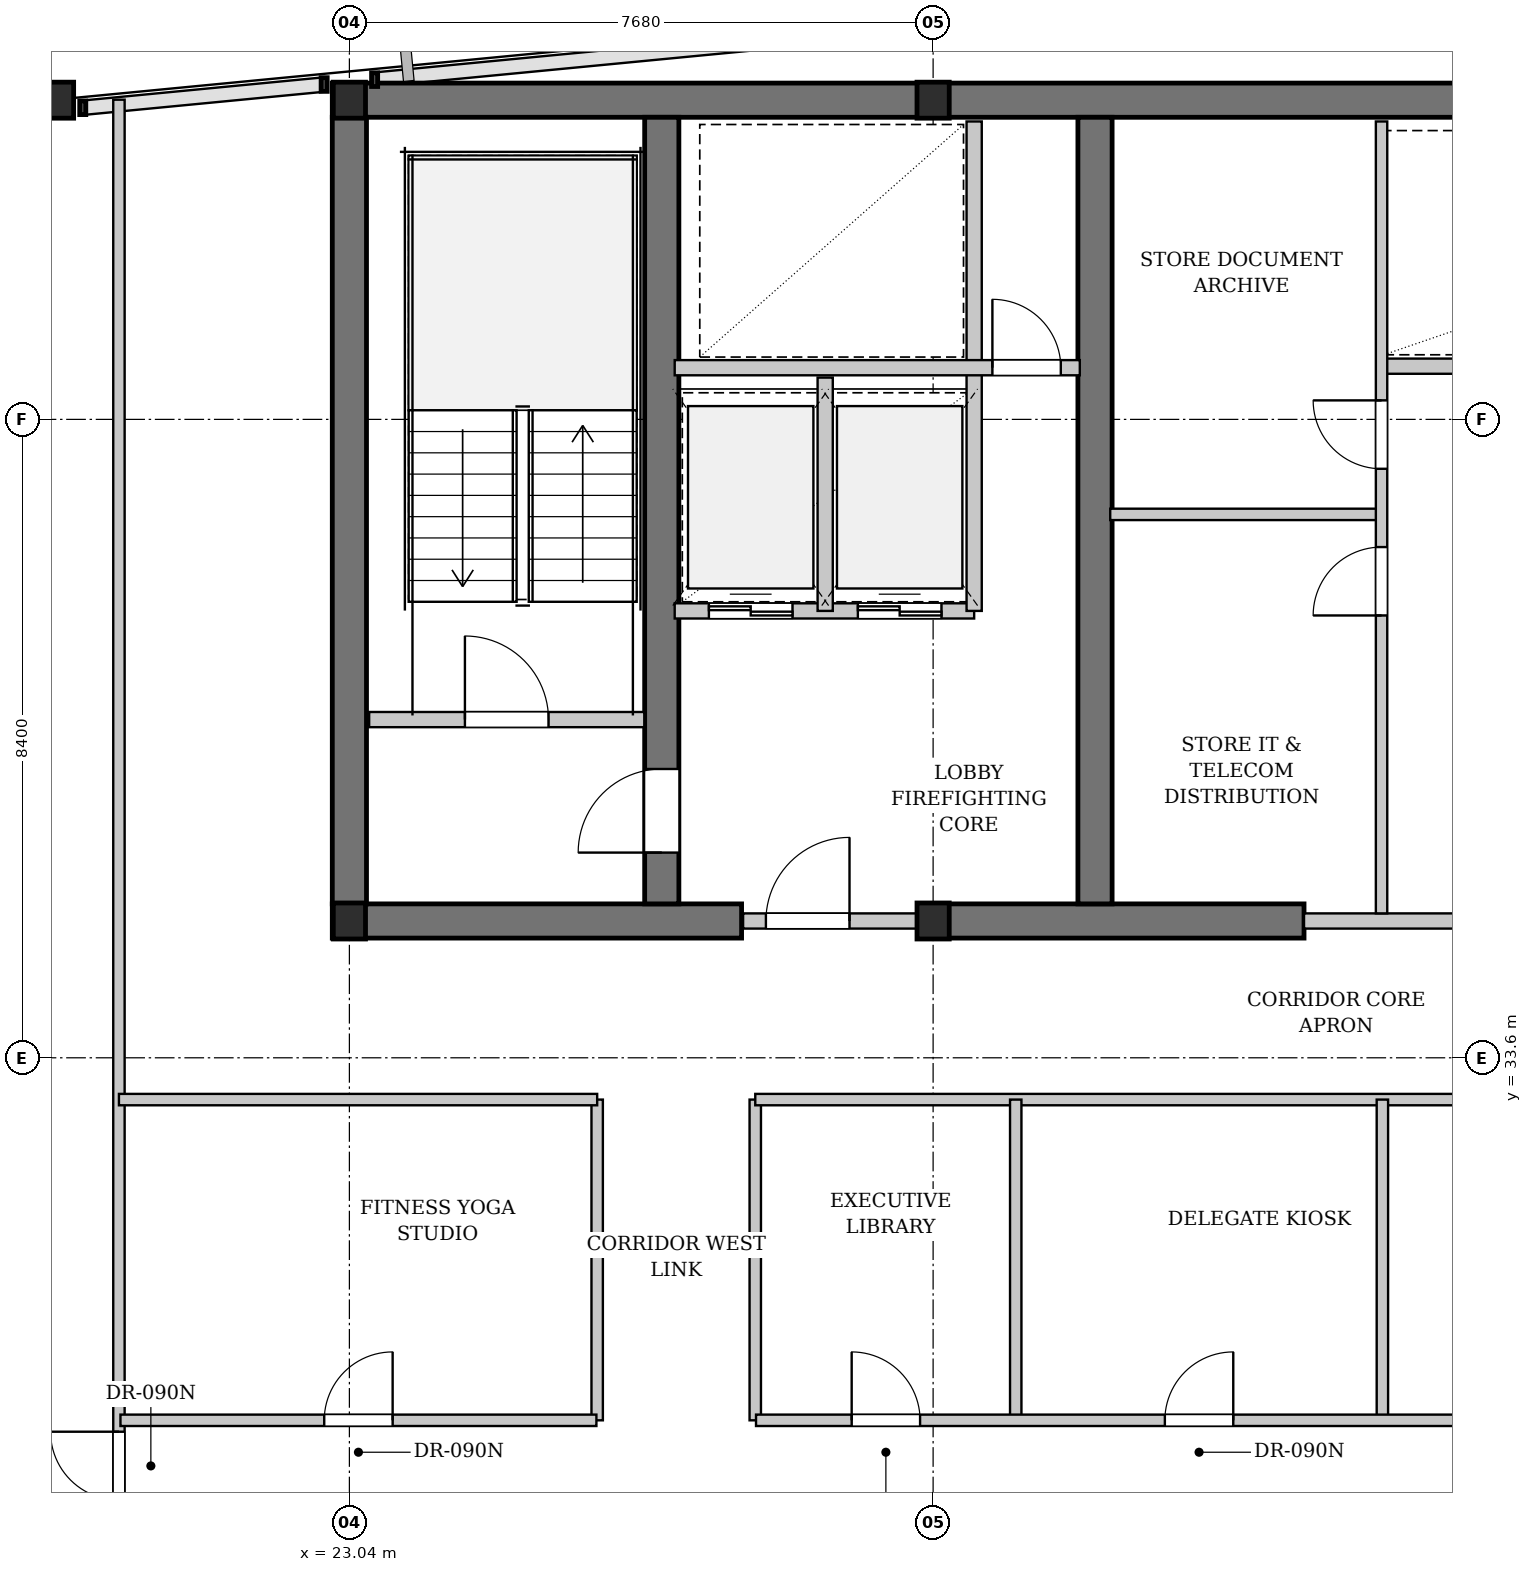
"""IFC4 building model, lengths in metres.
Left out: names, types, materials, properties, quantities, classifications, styles, units other than length and angle.
Written with IfcOpenShell. Run it as: python <this file> out.ifc"""

import sys

from ifc_helpers import new_model, si_unit, direction, frame, frame_2d, origin, origin_2d, place, context, subcontext, project, spatial, rectangle, i_section, extrude, element, fill, save


model = new_model("IFC4")
c1 = context("Model", 3, precision=1e-05, world=origin(), true_north=direction((0.0, 1.0)))
c2 = subcontext(c1, "Body", "Model", "MODEL_VIEW")
j1 = project(units=[si_unit("LENGTHUNIT", "METRE"), si_unit("PLANEANGLEUNIT", "RADIAN")], contexts=[c1])
p1 = place(None, origin())
s1 = spatial("IfcSite", under=j1, at=p1, CompositionType="ELEMENT")
p2 = place(p1, origin())
s2 = spatial("IfcBuilding", under=s1, at=p2, CompositionType="ELEMENT")
p3 = place(p2, frame((0.0, 0.0, 106.7)))
s3 = spatial("IfcBuildingStorey", under=s2, at=p3, CompositionType="ELEMENT", Elevation=106.7)
p4 = place(p3, frame((22.815, 46.2, 0.0), z_axis=(0.0, 0.0, 1.0), x_axis=(1.0, 0.0, 0.0)))
e1 = element("IfcWall", 1, at=p4, inside=s3, PredefinedType="SHEAR", context=c2, shape_type="SweptSolid", body=[
    extrude(rectangle(XDim=31.17, YDim=0.45, at=frame_2d((15.585, 0.0))), origin(), (0.0, 0.0, 1.0), 3.18),
])
p5 = place(p3, frame((22.815, 35.4, 0.0), z_axis=(0.0, 0.0, 1.0), x_axis=(1.0, 0.0, 0.0)))
e2 = element("IfcWall", 2, at=p5, inside=s3, PredefinedType="SHEAR", context=c2, shape_type="SweptSolid", body=[
    extrude(rectangle(XDim=5.385, YDim=0.45, at=frame_2d((2.692, 0.0))), origin(), (0.0, 0.0, 1.0), 3.18),
])
p6 = place(p3, frame((30.72, 35.4, 0.0), z_axis=(0.0, 0.0, 1.0), x_axis=(1.0, 0.0, 0.0)))
e3 = element("IfcWall", 3, at=p6, inside=s3, PredefinedType="SHEAR", context=c2, shape_type="SweptSolid", body=[
    extrude(rectangle(XDim=4.88, YDim=0.45, at=frame_2d((2.44, 0.0))), origin(), (0.0, 0.0, 1.0), 3.18),
])
p7 = place(p3, frame((23.04, 35.625, 0.0), z_axis=(0.0, 0.0, 1.0), x_axis=(0.0, 1.0, 0.0)))
e4 = element("IfcWall", 4, at=p7, inside=s3, PredefinedType="SHEAR", context=c2, shape_type="SweptSolid", body=[
    extrude(rectangle(XDim=10.35, YDim=0.45, at=frame_2d((5.175, 0.0))), origin(), (0.0, 0.0, 1.0), 3.18),
])
p8 = place(p3, frame((27.15, 35.625, 0.0), z_axis=(0.0, 0.0, 1.0), x_axis=(0.0, 1.0, 0.0)))
e5 = element("IfcWall", 5, at=p8, inside=s3, PredefinedType="SHEAR", context=c2, shape_type="SweptSolid", body=[
    extrude(rectangle(XDim=10.35, YDim=0.45, at=frame_2d((5.175, 0.0))), origin(), (0.0, 0.0, 1.0), 3.18),
])
p9 = place(p8, frame((0.675, 0.0, 0.0)))
e6 = element("IfcOpeningElement", 6, at=p9, cuts=e5, PredefinedType="OPENING", context=c2, shape_type="SweptSolid", body=[
    extrude(rectangle(XDim=1.1, YDim=2.15, at=frame_2d((0.55, 1.075))), frame((0.0, 0.235, 0.0), z_axis=(0.0, -1.0, 0.0), x_axis=(1.0, 0.0, 0.0)), (0.0, 0.0, 1.0), 0.47),
])
p10 = place(p3, frame((32.85, 35.625, 0.0), z_axis=(0.0, 0.0, 1.0), x_axis=(0.0, 1.0, 0.0)))
e7 = element("IfcWall", 7, at=p10, inside=s3, PredefinedType="SHEAR", context=c2, shape_type="SweptSolid", body=[
    extrude(rectangle(XDim=10.35, YDim=0.45, at=frame_2d((5.175, 0.0))), origin(), (0.0, 0.0, 1.0), 3.18),
])
for number, where, z_axis, x_axis in (
    (8, (23.04, 35.4, 0.0), (0.0, 0.0, 1.0), (1.0, 0.0, 0.0)),
    (9, (23.04, 46.2, 0.0), (0.0, 0.0, 1.0), (1.0, 0.0, 0.0)),
    (10, (30.72, 35.4, 0.0), (0.0, 0.0, 1.0), (1.0, 0.0, 0.0)),
    (11, (30.72, 46.2, 0.0), (0.0, 0.0, 1.0), (1.0, 0.0, 0.0)),
    (12, (19.2, 46.2, 0.0), (0.0, 0.0, 1.0), (1.0, 0.0, 0.0)),
):
    element("IfcColumn", number, at=place(p3, frame(where, z_axis=z_axis, x_axis=x_axis)), inside=s3, PredefinedType="COLUMN", context=c2, shape_type="SweptSolid", body=[
        extrude(i_section(OverallWidth=0.424, OverallDepth=0.474, WebThickness=0.047, FlangeThickness=0.077, FilletRadius=0.015, at=origin_2d()), origin(), (0.0, 0.0, 1.0), 3.4),
    ])
p11 = place(p3, frame((23.3, 38.05, 0.0), z_axis=(0.0, 0.0, 1.0), x_axis=(1.0, 0.0, 0.0)))
e13 = element("IfcWall", 13, at=p11, inside=s3, PredefinedType="PARTITIONING", context=c2, shape_type="SweptSolid", body=[
    extrude(rectangle(XDim=3.62, YDim=0.2, at=frame_2d((1.81, 0.0))), origin(), (0.0, 0.0, 1.0), 3.18),
])
p12 = place(p11, frame((1.26, 0.0, 0.0)))
e14 = element("IfcOpeningElement", 14, at=p12, cuts=e13, PredefinedType="OPENING", context=c2, shape_type="SweptSolid", body=[
    extrude(rectangle(XDim=1.1, YDim=2.15, at=frame_2d((0.55, 1.075))), frame((0.0, 0.11, 0.0), z_axis=(0.0, -1.0, 0.0), x_axis=(1.0, 0.0, 0.0)), (0.0, 0.0, 1.0), 0.22),
])
p13 = place(p3, frame((28.22, 35.4, 0.0), z_axis=(0.0, 0.0, 1.0), x_axis=(1.0, 0.0, 0.0)))
e15 = element("IfcWall", 15, at=p13, inside=s3, PredefinedType="PARTITIONING", context=c2, shape_type="SweptSolid", body=[
    extrude(rectangle(XDim=2.5, YDim=0.2, at=frame_2d((1.25, 0.0))), origin(), (0.0, 0.0, 1.0), 2.525),
])
p14 = place(p13, frame((0.3, 0.0, 0.0)))
e16 = element("IfcOpeningElement", 16, at=p14, cuts=e15, PredefinedType="OPENING", context=c2, shape_type="SweptSolid", body=[
    extrude(rectangle(XDim=1.1, YDim=2.15, at=frame_2d((0.55, 1.075))), frame((0.0, 0.11, 0.0), z_axis=(0.0, -1.0, 0.0), x_axis=(1.0, 0.0, 0.0)), (0.0, 0.0, 1.0), 0.22),
])
p15 = place(p3, frame((27.32, 39.48, 0.0), z_axis=(0.0, 0.0, 1.0), x_axis=(1.0, 0.0, 0.0)))
e17 = element("IfcWall", 17, at=p15, inside=s3, PredefinedType="PARTITIONING", context=c2, shape_type="SweptSolid", body=[
    extrude(rectangle(XDim=3.94, YDim=0.2, at=frame_2d((1.97, 0.0))), origin(), (0.0, 0.0, 1.0), 3.18),
])
p16 = place(p15, frame((0.45, 0.0, 0.0)))
e18 = element("IfcOpeningElement", 18, at=p16, cuts=e17, PredefinedType="OPENING", context=c2, shape_type="SweptSolid", body=[
    extrude(rectangle(XDim=1.1, YDim=2.2, at=frame_2d((0.55, 1.1))), frame((0.0, 0.11, 0.0), z_axis=(0.0, -1.0, 0.0), x_axis=(1.0, 0.0, 0.0)), (0.0, 0.0, 1.0), 0.22),
])
p17 = place(p15, frame((2.41, 0.0, 0.0)))
e19 = element("IfcOpeningElement", 19, at=p17, cuts=e17, PredefinedType="OPENING", context=c2, shape_type="SweptSolid", body=[
    extrude(rectangle(XDim=1.1, YDim=2.2, at=frame_2d((0.55, 1.1))), frame((0.0, 0.11, 0.0), z_axis=(0.0, -1.0, 0.0), x_axis=(1.0, 0.0, 0.0)), (0.0, 0.0, 1.0), 0.22),
])
p18 = place(p3, frame((29.3, 39.48, 0.0), z_axis=(0.0, 0.0, 1.0), x_axis=(0.0, 1.0, 0.0)))
e20 = element("IfcWall", 20, at=p18, inside=s3, PredefinedType="PARTITIONING", context=c2, shape_type="SweptSolid", body=[
    extrude(rectangle(XDim=3.07, YDim=0.2, at=frame_2d((1.535, 0.0))), origin(), (0.0, 0.0, 1.0), 3.18),
])
p19 = place(p3, frame((31.26, 39.48, 0.0), z_axis=(0.0, 0.0, 1.0), x_axis=(0.0, 1.0, 0.0)))
e21 = element("IfcWall", 21, at=p19, inside=s3, PredefinedType="PARTITIONING", context=c2, shape_type="SweptSolid", body=[
    extrude(rectangle(XDim=6.44, YDim=0.2, at=frame_2d((3.22, 0.0))), origin(), (0.0, 0.0, 1.0), 3.18),
])
p20 = place(p3, frame((27.32, 42.68, 0.0), z_axis=(0.0, 0.0, 1.0), x_axis=(1.0, 0.0, 0.0)))
e22 = element("IfcWall", 22, at=p20, inside=s3, PredefinedType="PARTITIONING", context=c2, shape_type="SweptSolid", body=[
    extrude(rectangle(XDim=5.33, YDim=0.2, at=frame_2d((2.665, 0.0))), origin(), (0.0, 0.0, 1.0), 3.18),
])
p21 = place(p20, frame((4.18, 0.0, 0.0)))
e23 = element("IfcOpeningElement", 23, at=p21, cuts=e22, PredefinedType="OPENING", context=c2, shape_type="SweptSolid", body=[
    extrude(rectangle(XDim=0.9, YDim=2.15, at=frame_2d((0.45, 1.075))), frame((0.0, 0.11, 0.0), z_axis=(0.0, -1.0, 0.0), x_axis=(1.0, 0.0, 0.0)), (0.0, 0.0, 1.0), 0.22),
])
p22 = place(p3, frame((35.6, 35.4, 0.0), z_axis=(0.0, 0.0, 1.0), x_axis=(1.0, 0.0, 0.0)))
e24 = element("IfcWall", 24, at=p22, inside=s3, PredefinedType="PARTITIONING", context=c2, shape_type="SweptSolid", body=[
    extrude(rectangle(XDim=6.5, YDim=0.2, at=frame_2d((3.25, 0.0))), origin(), (0.0, 0.0, 1.0), 2.525),
])
p23 = place(p22, frame((3.8, 0.0, 0.0)))
e25 = element("IfcOpeningElement", 25, at=p23, cuts=e24, PredefinedType="OPENING", context=c2, shape_type="SweptSolid", body=[
    extrude(rectangle(XDim=1.8, YDim=2.3, at=frame_2d((0.9, 1.15))), frame((0.0, 0.11, 0.0), z_axis=(0.0, -1.0, 0.0), x_axis=(1.0, 0.0, 0.0)), (0.0, 0.0, 1.0), 0.22),
])
p24 = place(p3, frame((36.6, 42.7, 0.0), z_axis=(0.0, 0.0, 1.0), x_axis=(1.0, 0.0, 0.0)))
e26 = element("IfcWall", 26, at=p24, inside=s3, PredefinedType="PARTITIONING", context=c2, shape_type="SweptSolid", body=[
    extrude(rectangle(XDim=5.25, YDim=0.2, at=frame_2d((2.625, 0.0))), origin(), (0.0, 0.0, 1.0), 3.18),
])
p25 = place(p3, frame((33.05, 40.75, 0.0), z_axis=(0.0, 0.0, 1.0), x_axis=(1.0, 0.0, 0.0)))
e27 = element("IfcWall", 27, at=p25, inside=s3, PredefinedType="PARTITIONING", context=c2, shape_type="SweptSolid", body=[
    extrude(rectangle(XDim=3.57, YDim=0.15, at=frame_2d((1.785, 0.0))), origin(), (0.0, 0.0, 1.0), 3.18),
])
p26 = place(p3, frame((36.62, 35.5, 0.0), z_axis=(0.0, 0.0, 1.0), x_axis=(0.0, 1.0, 0.0)))
e28 = element("IfcWall", 28, at=p26, inside=s3, PredefinedType="PARTITIONING", context=c2, shape_type="SweptSolid", body=[
    extrude(rectangle(XDim=10.42, YDim=0.15, at=frame_2d((5.21, 0.0))), origin(), (0.0, 0.0, 1.0), 3.18),
])
p27 = place(p26, frame((3.92, 0.0, 0.0)))
e29 = element("IfcOpeningElement", 29, at=p27, cuts=e28, PredefinedType="OPENING", context=c2, shape_type="SweptSolid", body=[
    extrude(rectangle(XDim=0.9, YDim=2.15, at=frame_2d((0.45, 1.075))), frame((0.0, 0.085, 0.0), z_axis=(0.0, -1.0, 0.0), x_axis=(1.0, 0.0, 0.0)), (0.0, 0.0, 1.0), 0.17),
])
p28 = place(p26, frame((5.85, 0.0, 0.0)))
e30 = element("IfcOpeningElement", 30, at=p28, cuts=e28, PredefinedType="OPENING", context=c2, shape_type="SweptSolid", body=[
    extrude(rectangle(XDim=0.9, YDim=2.15, at=frame_2d((0.45, 1.075))), frame((0.0, 0.085, 0.0), z_axis=(0.0, -1.0, 0.0), x_axis=(1.0, 0.0, 0.0)), (0.0, 0.0, 1.0), 0.17),
])
p29 = place(p3, frame((20.008, 26.75, 0.0), z_axis=(0.0, 0.0, 1.0), x_axis=(0.0, 1.0, 0.0)))
e31 = element("IfcWall", 31, at=p29, inside=s3, PredefinedType="PARTITIONING", context=c2, shape_type="SweptSolid", body=[
    extrude(rectangle(XDim=19.456, YDim=0.15, at=frame_2d((9.728, 0.0))), origin(), (0.0, 0.0, 1.0), 3.18),
])
p30 = place(p29, frame((1.03, 0.0, 0.0)))
e32 = element("IfcOpeningElement", 32, at=p30, cuts=e31, PredefinedType="OPENING", context=c2, shape_type="SweptSolid", body=[
    extrude(rectangle(XDim=0.9, YDim=2.15, at=frame_2d((0.45, 1.075))), frame((0.0, 0.085, 0.0), z_axis=(0.0, -1.0, 0.0), x_axis=(1.0, 0.0, 0.0)), (0.0, 0.0, 1.0), 0.17),
])
for number, where, z_axis, x_axis in (
    (33, (26.3, 28.83, 0.0), (0.0, 0.0, 1.0), (0.0, 1.0, 0.0)),
    (34, (28.38, 28.83, 0.0), (0.0, 0.0, 1.0), (0.0, 1.0, 0.0)),
):
    element("IfcWall", number, at=place(p3, frame(where, z_axis=z_axis, x_axis=x_axis)), inside=s3, PredefinedType="PARTITIONING", context=c2, shape_type="SweptSolid", body=[
        extrude(rectangle(XDim=4.22, YDim=0.15, at=frame_2d((2.11, 0.0))), origin(), (0.0, 0.0, 1.0), 3.18),
    ])
p31 = place(p3, frame((20.008, 33.05, 0.0), z_axis=(0.0, 0.0, 1.0), x_axis=(1.0, 0.0, 0.0)))
e35 = element("IfcWall", 35, at=p31, inside=s3, PredefinedType="PARTITIONING", context=c2, shape_type="SweptSolid", body=[
    extrude(rectangle(XDim=6.292, YDim=0.15, at=frame_2d((3.146, 0.0))), origin(), (0.0, 0.0, 1.0), 3.18),
])
p32 = place(p3, frame((28.38, 33.05, 0.0), z_axis=(0.0, 0.0, 1.0), x_axis=(1.0, 0.0, 0.0)))
e36 = element("IfcWall", 36, at=p32, inside=s3, PredefinedType="PARTITIONING", context=c2, shape_type="SweptSolid", body=[
    extrude(rectangle(XDim=20.12, YDim=0.15, at=frame_2d((10.06, 0.0))), origin(), (0.0, 0.0, 1.0), 3.18),
])
p33 = place(p3, frame((20.028, 28.83, 0.0), z_axis=(0.0, 0.0, 1.0), x_axis=(1.0, 0.0, 0.0)))
e37 = element("IfcWall", 37, at=p33, inside=s3, PredefinedType="PARTITIONING", context=c2, shape_type="SweptSolid", body=[
    extrude(rectangle(XDim=6.262, YDim=0.15, at=frame_2d((3.131, 0.0))), origin(), (0.0, 0.0, 1.0), 3.18),
])
p34 = place(p33, frame((2.681, 0.0, 0.0)))
e38 = element("IfcOpeningElement", 38, at=p34, cuts=e37, PredefinedType="OPENING", context=c2, shape_type="SweptSolid", body=[
    extrude(rectangle(XDim=0.9, YDim=2.15, at=frame_2d((0.45, 1.075))), frame((0.0, 0.085, 0.0), z_axis=(0.0, -1.0, 0.0), x_axis=(1.0, 0.0, 0.0)), (0.0, 0.0, 1.0), 0.17),
])
for number, where, z_axis, x_axis in (
    (39, (31.807, 28.83, 0.0), (0.0, 0.0, 1.0), (0.0, 1.0, 0.0)),
    (40, (36.631, 28.83, 0.0), (0.0, 0.0, 1.0), (0.0, 1.0, 0.0)),
):
    element("IfcWall", number, at=place(p3, frame(where, z_axis=z_axis, x_axis=x_axis)), inside=s3, PredefinedType="PARTITIONING", context=c2, shape_type="SweptSolid", body=[
        extrude(rectangle(XDim=4.22, YDim=0.15, at=frame_2d((2.11, 0.0))), origin(), (0.0, 0.0, 1.0), 3.18),
    ])
p35 = place(p3, frame((28.39, 28.83, 0.0), z_axis=(0.0, 0.0, 1.0), x_axis=(1.0, 0.0, 0.0)))
e41 = element("IfcWall", 41, at=p35, inside=s3, PredefinedType="PARTITIONING", context=c2, shape_type="SweptSolid", body=[
    extrude(rectangle(XDim=20.1, YDim=0.15, at=frame_2d((10.05, 0.0))), origin(), (0.0, 0.0, 1.0), 3.18),
])
p36 = place(p35, frame((1.259, 0.0, 0.0)))
e42 = element("IfcOpeningElement", 42, at=p36, cuts=e41, PredefinedType="OPENING", context=c2, shape_type="SweptSolid", body=[
    extrude(rectangle(XDim=0.9, YDim=2.15, at=frame_2d((0.45, 1.075))), frame((0.0, 0.085, 0.0), z_axis=(0.0, -1.0, 0.0), x_axis=(1.0, 0.0, 0.0)), (0.0, 0.0, 1.0), 0.17),
])
p37 = place(p35, frame((5.379, 0.0, 0.0)))
e43 = element("IfcOpeningElement", 43, at=p37, cuts=e41, PredefinedType="OPENING", context=c2, shape_type="SweptSolid", body=[
    extrude(rectangle(XDim=0.9, YDim=2.15, at=frame_2d((0.45, 1.075))), frame((0.0, 0.085, 0.0), z_axis=(0.0, -1.0, 0.0), x_axis=(1.0, 0.0, 0.0)), (0.0, 0.0, 1.0), 0.17),
])
p38 = place(p35, frame((10.906, 0.0, 0.0)))
e44 = element("IfcOpeningElement", 44, at=p38, cuts=e41, PredefinedType="OPENING", context=c2, shape_type="SweptSolid", body=[
    extrude(rectangle(XDim=0.9, YDim=2.15, at=frame_2d((0.45, 1.075))), frame((0.0, 0.085, 0.0), z_axis=(0.0, -1.0, 0.0), x_axis=(1.0, 0.0, 0.0)), (0.0, 0.0, 1.0), 0.17),
])
p39 = place(p35, frame((16.836, 0.0, 0.0)))
e45 = element("IfcOpeningElement", 45, at=p39, cuts=e41, PredefinedType="OPENING", context=c2, shape_type="SweptSolid", body=[
    extrude(rectangle(XDim=0.9, YDim=2.15, at=frame_2d((0.45, 1.075))), frame((0.0, 0.085, 0.0), z_axis=(0.0, -1.0, 0.0), x_axis=(1.0, 0.0, 0.0)), (0.0, 0.0, 1.0), 0.17),
])
p40 = place(p12, origin())
e46 = element("IfcDoor", 46, at=p40, inside=s3, OperationType="SINGLE_SWING_LEFT", PredefinedType="DOOR", context=c2, shape_type="SweptSolid", body=[
    extrude(rectangle(XDim=1.1, YDim=2.15, at=frame_2d((0.55, 1.075))), frame((0.0, 0.025, 0.0), z_axis=(0.0, -1.0, 0.0), x_axis=(1.0, 0.0, 0.0)), (0.0, 0.0, 1.0), 0.05),
])
fill(e14, e46)
p41 = place(p14, origin())
e47 = element("IfcDoor", 47, at=p41, inside=s3, OperationType="SINGLE_SWING_RIGHT", PredefinedType="DOOR", context=c2, shape_type="SweptSolid", body=[
    extrude(rectangle(XDim=1.1, YDim=2.15, at=frame_2d((0.55, 1.075))), frame((0.0, 0.025, 0.0), z_axis=(0.0, -1.0, 0.0), x_axis=(1.0, 0.0, 0.0)), (0.0, 0.0, 1.0), 0.05),
])
fill(e16, e47)
p42 = place(p16, origin())
e48 = element("IfcDoor", 48, at=p42, inside=s3, OperationType="DOUBLE_DOOR_SLIDING", PredefinedType="DOOR", context=c2, shape_type="SweptSolid", body=[
    extrude(rectangle(XDim=1.1, YDim=2.2, at=frame_2d((0.55, 1.1))), frame((0.0, 0.025, 0.0), z_axis=(0.0, -1.0, 0.0), x_axis=(1.0, 0.0, 0.0)), (0.0, 0.0, 1.0), 0.05),
])
fill(e18, e48)
p43 = place(p17, origin())
e49 = element("IfcDoor", 49, at=p43, inside=s3, OperationType="DOUBLE_DOOR_SLIDING", PredefinedType="DOOR", context=c2, shape_type="SweptSolid", body=[
    extrude(rectangle(XDim=1.1, YDim=2.2, at=frame_2d((0.55, 1.1))), frame((0.0, 0.025, 0.0), z_axis=(0.0, -1.0, 0.0), x_axis=(1.0, 0.0, 0.0)), (0.0, 0.0, 1.0), 0.05),
])
fill(e19, e49)
p44 = place(p21, origin())
e50 = element("IfcDoor", 50, at=p44, inside=s3, OperationType="SINGLE_SWING_LEFT", PredefinedType="DOOR", context=c2, shape_type="SweptSolid", body=[
    extrude(rectangle(XDim=0.9, YDim=2.15, at=frame_2d((0.45, 1.075))), frame((0.0, 0.025, 0.0), z_axis=(0.0, -1.0, 0.0), x_axis=(1.0, 0.0, 0.0)), (0.0, 0.0, 1.0), 0.05),
])
fill(e23, e50)
p45 = place(p27, origin())
e51 = element("IfcDoor", 51, at=p45, inside=s3, OperationType="SINGLE_SWING_LEFT", PredefinedType="DOOR", context=c2, shape_type="SweptSolid", body=[
    extrude(rectangle(XDim=0.9, YDim=2.15, at=frame_2d((0.45, 1.075))), frame((0.0, 0.025, 0.0), z_axis=(0.0, -1.0, 0.0), x_axis=(1.0, 0.0, 0.0)), (0.0, 0.0, 1.0), 0.05),
])
fill(e29, e51)
p46 = place(p28, origin())
e52 = element("IfcDoor", 52, at=p46, inside=s3, OperationType="SINGLE_SWING_RIGHT", PredefinedType="DOOR", context=c2, shape_type="SweptSolid", body=[
    extrude(rectangle(XDim=0.9, YDim=2.15, at=frame_2d((0.45, 1.075))), frame((0.0, 0.025, 0.0), z_axis=(0.0, -1.0, 0.0), x_axis=(1.0, 0.0, 0.0)), (0.0, 0.0, 1.0), 0.05),
])
fill(e30, e52)
p47 = place(p30, origin())
e53 = element("IfcDoor", 53, at=p47, inside=s3, OperationType="SINGLE_SWING_RIGHT", PredefinedType="DOOR", context=c2, shape_type="SweptSolid", body=[
    extrude(rectangle(XDim=0.9, YDim=2.15, at=frame_2d((0.45, 1.075))), frame((0.0, 0.025, 0.0), z_axis=(0.0, -1.0, 0.0), x_axis=(1.0, 0.0, 0.0)), (0.0, 0.0, 1.0), 0.05),
])
fill(e32, e53)
p48 = place(p34, origin())
e54 = element("IfcDoor", 54, at=p48, inside=s3, OperationType="SINGLE_SWING_RIGHT", PredefinedType="DOOR", context=c2, shape_type="SweptSolid", body=[
    extrude(rectangle(XDim=0.9, YDim=2.15, at=frame_2d((0.45, 1.075))), frame((0.0, 0.025, 0.0), z_axis=(0.0, -1.0, 0.0), x_axis=(1.0, 0.0, 0.0)), (0.0, 0.0, 1.0), 0.05),
])
fill(e38, e54)
p49 = place(p36, origin())
e55 = element("IfcDoor", 55, at=p49, inside=s3, OperationType="SINGLE_SWING_LEFT", PredefinedType="DOOR", context=c2, shape_type="SweptSolid", body=[
    extrude(rectangle(XDim=0.9, YDim=2.15, at=frame_2d((0.45, 1.075))), frame((0.0, 0.025, 0.0), z_axis=(0.0, -1.0, 0.0), x_axis=(1.0, 0.0, 0.0)), (0.0, 0.0, 1.0), 0.05),
])
fill(e42, e55)
p50 = place(p37, origin())
e56 = element("IfcDoor", 56, at=p50, inside=s3, OperationType="SINGLE_SWING_RIGHT", PredefinedType="DOOR", context=c2, shape_type="SweptSolid", body=[
    extrude(rectangle(XDim=0.9, YDim=2.15, at=frame_2d((0.45, 1.075))), frame((0.0, 0.025, 0.0), z_axis=(0.0, -1.0, 0.0), x_axis=(1.0, 0.0, 0.0)), (0.0, 0.0, 1.0), 0.05),
])
fill(e43, e56)
p51 = place(p9, origin())
e57 = element("IfcDoor", 57, at=p51, inside=s3, OperationType="SINGLE_SWING_LEFT", PredefinedType="DOOR", context=c2, shape_type="SweptSolid", body=[
    extrude(rectangle(XDim=1.1, YDim=2.15, at=frame_2d((0.55, 1.075))), frame((0.0, 0.025, 0.0), z_axis=(0.0, -1.0, 0.0), x_axis=(1.0, 0.0, 0.0)), (0.0, 0.0, 1.0), 0.05),
])
fill(e6, e57)
save(model, sys.argv[1])
